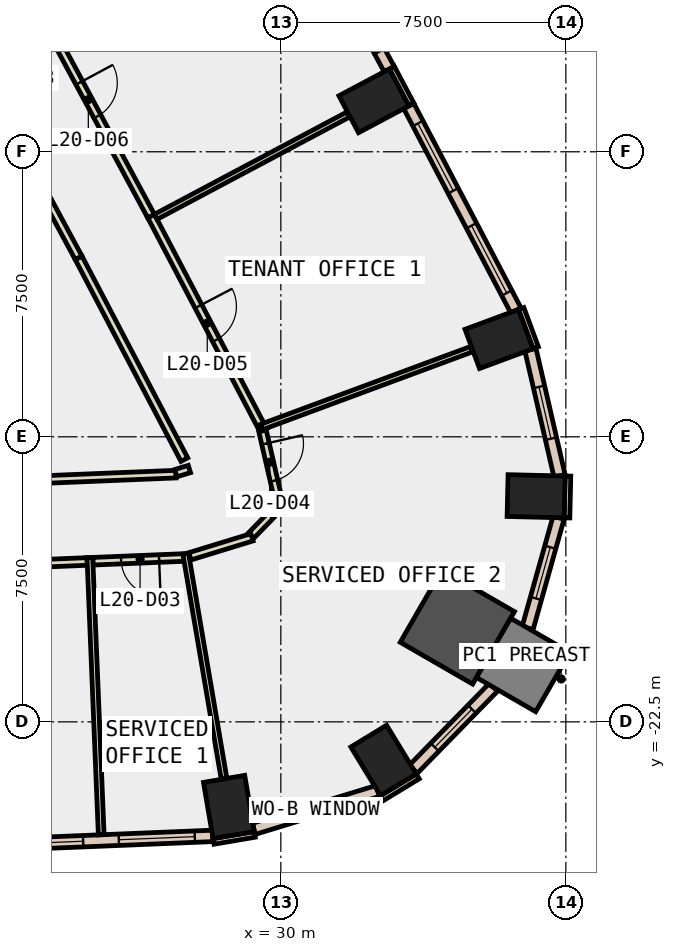
"""IFC4 building model, lengths in metres.
Left out: names, types, materials, properties, quantities, classifications, styles, units other than length and angle.
Written with IfcOpenShell. Run it as: python <this file> out.ifc"""

import sys

from ifc_helpers import new_model, si_unit, direction, frame, frame_2d, origin, origin_2d, place, context, subcontext, project, spatial, rectangle, extrude, element, fill, save


model = new_model("IFC4")
c1 = context("Model", 3, precision=1e-05, world=origin(), true_north=direction((0.0, 1.0)))
c2 = subcontext(c1, "Body", "Model", "MODEL_VIEW")
j1 = project(units=[si_unit("LENGTHUNIT", "METRE"), si_unit("PLANEANGLEUNIT", "RADIAN")], contexts=[c1])
p1 = place(None, origin())
s1 = spatial("IfcSite", under=j1, at=p1, CompositionType="ELEMENT")
p2 = place(p1, origin())
s2 = spatial("IfcBuilding", under=s1, at=p2, CompositionType="ELEMENT")
p3 = place(p2, frame((0.0, 0.0, 95.0)))
s3 = spatial("IfcBuildingStorey", under=s2, at=p3, CompositionType="ELEMENT", Elevation=95.0)
for number, where, z_axis, x_axis in (
    (1, (28.633, -24.74, -0.4), (0.0, 0.0, 1.0), (0.986, 0.168, 0.0)),
    (2, (32.703, -23.516, -0.4), (0.0, 0.0, 1.0), (0.854, 0.52, 0.0)),
):
    element("IfcColumn", number, at=place(p3, frame(where, z_axis=z_axis, x_axis=x_axis)), inside=s3, PredefinedType="COLUMN", context=c2, shape_type="SweptSolid", body=[
        extrude(rectangle(XDim=1.1, YDim=1.5, at=origin_2d()), origin(), (0.0, 0.0, 1.0), 4.2),
    ])
p4 = place(p3, frame((34.645, -20.003, -0.4), z_axis=(0.0, 0.0, 1.0), x_axis=(-0.866025403784, 0.5, 0.0)))
e3 = element("IfcColumn", 3, at=p4, inside=s3, PredefinedType="COLUMN", context=c2, shape_type="SweptSolid", body=[
    extrude(rectangle(XDim=2.2, YDim=2.2, at=origin_2d()), origin(), (0.0, 0.0, 1.0), 4.2),
])
for number, where, z_axis, x_axis in (
    (4, (36.717, -16.564, -0.4), (0.0, 0.0, 1.0), (0.023, 1.0, 0.0)),
    (5, (35.741, -12.427, -0.4), (0.0, 0.0, 1.0), (-0.347, 0.938, 0.0)),
    (6, (32.449, -6.16, -0.4), (0.0, 0.0, 1.0), (-0.469, 0.883, 0.0)),
):
    element("IfcColumn", number, at=place(p3, frame(where, z_axis=z_axis, x_axis=x_axis)), inside=s3, PredefinedType="COLUMN", context=c2, shape_type="SweptSolid", body=[
        extrude(rectangle(XDim=1.1, YDim=1.5, at=origin_2d()), origin(), (0.0, 0.0, 1.0), 4.2),
    ])
p5 = place(p3, frame((36.377, -21.003, -0.4), z_axis=(0.0, 0.0, 1.0), x_axis=(-0.866025403784, 0.5, 0.0)))
e7 = element("IfcColumn", 7, at=p5, inside=s3, PredefinedType="COLUMN", context=c2, shape_type="SweptSolid", body=[
    extrude(rectangle(XDim=1.8, YDim=1.8, at=origin_2d()), origin(), (0.0, 0.0, 1.0), 4.2),
])
p6 = place(p3, frame((36.706, -12.656, 0.0), z_axis=(0.0, 0.0, 1.0), x_axis=(-0.347205967468, 0.937788897436, 0.0)))
e8 = element("IfcWall", 8, at=p6, inside=s3, PredefinedType="STANDARD", context=c2, shape_type="SweptSolid", body=[
    extrude(rectangle(XDim=1.1, YDim=0.15, at=frame_2d((0.55, 0.0))), origin(), (0.0, 0.0, 1.0), 3.8),
])
p7 = place(p3, frame((33.436, -6.259, 0.0), z_axis=(0.0, 0.0, 1.0), x_axis=(-0.469366248657, 0.883003581319, 0.0)))
e9 = element("IfcWall", 9, at=p7, inside=s3, PredefinedType="STANDARD", context=c2, shape_type="SweptSolid", body=[
    extrude(rectangle(XDim=1.1, YDim=0.15, at=frame_2d((0.55, 0.0))), origin(), (0.0, 0.0, 1.0), 3.8),
])
p8 = place(p3, frame((28.229, -25.646, 0.0), z_axis=(0.0, 0.0, 1.0), x_axis=(0.985763338892, 0.168138751323, 0.0)))
e10 = element("IfcWall", 10, at=p8, inside=s3, PredefinedType="STANDARD", context=c2, shape_type="SweptSolid", body=[
    extrude(rectangle(XDim=1.101, YDim=0.15, at=frame_2d((0.55, 0.0))), origin(), (0.0, 0.0, 1.0), 3.8),
])
for number, where, z_axis, x_axis in (
    (11, (32.662, -24.507, 0.0), (0.0, 0.0, 1.0), (0.854, 0.52, 0.0)),
    (12, (37.529, -17.133, 0.0), (0.0, 0.0, 1.0), (0.024, 1.0, 0.0)),
):
    element("IfcWall", number, at=place(p3, frame(where, z_axis=z_axis, x_axis=x_axis)), inside=s3, PredefinedType="STANDARD", context=c2, shape_type="SweptSolid", body=[
        extrude(rectangle(XDim=1.1, YDim=0.15, at=frame_2d((0.55, 0.0))), origin(), (0.0, 0.0, 1.0), 3.8),
    ])
p9 = place(p3, frame((22.332, -25.742, 0.0), z_axis=(0.0, 0.0, 1.0), x_axis=(0.999159360905, 0.040994774244, 0.0)))
e13 = element("IfcWall", 13, at=p9, inside=s3, PredefinedType="STANDARD", context=c2, shape_type="SweptSolid", body=[
    extrude(rectangle(XDim=5.878, YDim=0.3, at=frame_2d((2.939, 0.0))), origin(), (0.0, 0.0, 1.0), 3.8),
])
p10 = place(p9, frame((0.469, 0.0, 0.9)))
e14 = element("IfcOpeningElement", 14, at=p10, cuts=e13, PredefinedType="OPENING", context=c2, shape_type="SweptSolid", body=[
    extrude(rectangle(XDim=2.0, YDim=2.6, at=frame_2d((1.0, 1.3))), frame((0.0, 0.16, 0.0), z_axis=(0.0, -1.0, 0.0), x_axis=(1.0, 0.0, 0.0)), (0.0, 0.0, 1.0), 0.32),
])
p11 = place(p9, frame((3.408, 0.0, 0.9)))
e15 = element("IfcOpeningElement", 15, at=p11, cuts=e13, PredefinedType="OPENING", context=c2, shape_type="SweptSolid", body=[
    extrude(rectangle(XDim=2.0, YDim=2.6, at=frame_2d((1.0, 1.3))), frame((0.0, 0.16, 0.0), z_axis=(0.0, -1.0, 0.0), x_axis=(1.0, 0.0, 0.0)), (0.0, 0.0, 1.0), 0.32),
])
p12 = place(p3, frame((29.288, -25.316, 0.0), z_axis=(0.0, 0.0, 1.0), x_axis=(0.956317661006, 0.292329490895, 0.0)))
e16 = element("IfcWall", 16, at=p12, inside=s3, PredefinedType="STANDARD", context=c2, shape_type="SweptSolid", body=[
    extrude(rectangle(XDim=3.41, YDim=0.3, at=frame_2d((1.705, 0.0))), origin(), (0.0, 0.0, 1.0), 3.8),
])
p13 = place(p12, frame((1.005, 0.0, 0.9)))
e17 = element("IfcOpeningElement", 17, at=p13, cuts=e16, PredefinedType="OPENING", context=c2, shape_type="SweptSolid", body=[
    extrude(rectangle(XDim=1.4, YDim=2.6, at=frame_2d((0.7, 1.3))), frame((0.0, 0.16, 0.0), z_axis=(0.0, -1.0, 0.0), x_axis=(1.0, 0.0, 0.0)), (0.0, 0.0, 1.0), 0.32),
])
p14 = place(p3, frame((33.486, -23.747, 0.0), z_axis=(0.0, 0.0, 1.0), x_axis=(0.698928244773, 0.715191798512, 0.0)))
e18 = element("IfcWall", 18, at=p14, inside=s3, PredefinedType="STANDARD", context=c2, shape_type="SweptSolid", body=[
    extrude(rectangle(XDim=3.017, YDim=0.3, at=frame_2d((1.509, 0.0))), origin(), (0.0, 0.0, 1.0), 3.8),
])
p15 = place(p14, frame((0.809, 0.0, 0.9)))
e19 = element("IfcOpeningElement", 19, at=p15, cuts=e18, PredefinedType="OPENING", context=c2, shape_type="SweptSolid", body=[
    extrude(rectangle(XDim=1.4, YDim=2.6, at=frame_2d((0.7, 1.3))), frame((0.0, 0.16, 0.0), z_axis=(0.0, -1.0, 0.0), x_axis=(1.0, 0.0, 0.0)), (0.0, 0.0, 1.0), 0.32),
])
p16 = place(p3, frame((36.494, -20.032, 0.0), z_axis=(0.0, 0.0, 1.0), x_axis=(0.270176120308, 0.962810918102, 0.0)))
e20 = element("IfcWall", 20, at=p16, inside=s3, PredefinedType="STANDARD", context=c2, shape_type="SweptSolid", body=[
    extrude(rectangle(XDim=3.017, YDim=0.3, at=frame_2d((1.509, 0.0))), origin(), (0.0, 0.0, 1.0), 3.8),
])
p17 = place(p16, frame((0.809, 0.0, 0.9)))
e21 = element("IfcOpeningElement", 21, at=p17, cuts=e20, PredefinedType="OPENING", context=c2, shape_type="SweptSolid", body=[
    extrude(rectangle(XDim=1.4, YDim=2.6, at=frame_2d((0.7, 1.3))), frame((0.0, 0.16, 0.0), z_axis=(0.0, -1.0, 0.0), x_axis=(1.0, 0.0, 0.0)), (0.0, 0.0, 1.0), 0.32),
])
p18 = place(p3, frame((37.335, -16.029, 0.0), z_axis=(0.0, 0.0, 1.0), x_axis=(-0.224859506699, 0.974391195695, 0.0)))
e22 = element("IfcWall", 22, at=p18, inside=s3, PredefinedType="STANDARD", context=c2, shape_type="SweptSolid", body=[
    extrude(rectangle(XDim=3.41, YDim=0.3, at=frame_2d((1.705, 0.0))), origin(), (0.0, 0.0, 1.0), 3.8),
])
p19 = place(p18, frame((1.005, 0.0, 0.9)))
e23 = element("IfcOpeningElement", 23, at=p19, cuts=e22, PredefinedType="OPENING", context=c2, shape_type="SweptSolid", body=[
    extrude(rectangle(XDim=1.4, YDim=2.6, at=frame_2d((0.7, 1.3))), frame((0.0, 0.16, 0.0), z_axis=(0.0, -1.0, 0.0), x_axis=(1.0, 0.0, 0.0)), (0.0, 0.0, 1.0), 0.32),
])
p20 = place(p3, frame((36.186, -11.676, 0.0), z_axis=(0.0, 0.0, 1.0), x_axis=(-0.464187178015, 0.885737130173, 0.0)))
e24 = element("IfcWall", 24, at=p20, inside=s3, PredefinedType="STANDARD", context=c2, shape_type="SweptSolid", body=[
    extrude(rectangle(XDim=6.075, YDim=0.3, at=frame_2d((3.038, 0.0))), origin(), (0.0, 0.0, 1.0), 3.8),
])
p21 = place(p20, frame((0.519, 0.0, 0.9)))
e25 = element("IfcOpeningElement", 25, at=p21, cuts=e24, PredefinedType="OPENING", context=c2, shape_type="SweptSolid", body=[
    extrude(rectangle(XDim=2.0, YDim=2.6, at=frame_2d((1.0, 1.3))), frame((0.0, 0.16, 0.0), z_axis=(0.0, -1.0, 0.0), x_axis=(1.0, 0.0, 0.0)), (0.0, 0.0, 1.0), 0.32),
])
p22 = place(p20, frame((3.556, 0.0, 0.9)))
e26 = element("IfcOpeningElement", 26, at=p22, cuts=e24, PredefinedType="OPENING", context=c2, shape_type="SweptSolid", body=[
    extrude(rectangle(XDim=2.0, YDim=2.6, at=frame_2d((1.0, 1.3))), frame((0.0, 0.16, 0.0), z_axis=(0.0, -1.0, 0.0), x_axis=(1.0, 0.0, 0.0)), (0.0, 0.0, 1.0), 0.32),
])
p23 = place(p3, frame((32.851, -5.325, 0.0), z_axis=(0.0, 0.0, 1.0), x_axis=(-0.474369552216, 0.880325807829, 0.0)))
e27 = element("IfcWall", 27, at=p23, inside=s3, PredefinedType="STANDARD", context=c2, shape_type="SweptSolid", body=[
    extrude(rectangle(XDim=6.099, YDim=0.3, at=frame_2d((3.049, 0.0))), origin(), (0.0, 0.0, 1.0), 3.8),
])
p24 = place(p23, frame((0.525, 0.0, 0.9)))
e28 = element("IfcOpeningElement", 28, at=p24, cuts=e27, PredefinedType="OPENING", context=c2, shape_type="SweptSolid", body=[
    extrude(rectangle(XDim=2.0, YDim=2.6, at=frame_2d((1.0, 1.3))), frame((0.0, 0.16, 0.0), z_axis=(0.0, -1.0, 0.0), x_axis=(1.0, 0.0, 0.0)), (0.0, 0.0, 1.0), 0.32),
])
p25 = place(p23, frame((3.574, 0.0, 0.9)))
e29 = element("IfcOpeningElement", 29, at=p25, cuts=e27, PredefinedType="OPENING", context=c2, shape_type="SweptSolid", body=[
    extrude(rectangle(XDim=2.0, YDim=2.6, at=frame_2d((1.0, 1.3))), frame((0.0, 0.16, 0.0), z_axis=(0.0, -1.0, 0.0), x_axis=(1.0, 0.0, 0.0)), (0.0, 0.0, 1.0), 0.32),
])
p26 = place(p3, frame((21.446, -16.22, 0.0), z_axis=(0.0, 0.0, 1.0), x_axis=(0.999157128819, 0.041049140426, 0.0)))
e30 = element("IfcWall", 30, at=p26, inside=s3, PredefinedType="PARTITIONING", context=c2, shape_type="SweptSolid", body=[
    extrude(rectangle(XDim=5.799, YDim=0.2, at=frame_2d((2.899, 0.0))), origin(), (0.0, 0.0, 1.0), 3.8),
])
p27 = place(p3, frame((27.235, -15.957, 0.0), z_axis=(0.0, 0.0, 1.0), x_axis=(0.956017741345, 0.293308844453, 0.0)))
e31 = element("IfcWall", 31, at=p27, inside=s3, PredefinedType="PARTITIONING", context=c2, shape_type="SweptSolid", body=[
    extrude(rectangle(XDim=0.375, YDim=0.2, at=frame_2d((0.188, 0.0))), origin(), (0.0, 0.0, 1.0), 3.8),
])
p28 = place(p3, frame((27.461, -15.6, 0.0), z_axis=(0.0, 0.0, 1.0), x_axis=(-0.464203280494, 0.885728691179, 0.0)))
e32 = element("IfcWall", 32, at=p28, inside=s3, PredefinedType="PARTITIONING", context=c2, shape_type="SweptSolid", body=[
    extrude(rectangle(XDim=5.995, YDim=0.2, at=frame_2d((2.998, 0.0))), origin(), (0.0, 0.0, 1.0), 3.8),
])
p29 = place(p3, frame((24.678, -10.29, 0.0), z_axis=(0.0, 0.0, 1.0), x_axis=(-0.474391588657, 0.880313932987, 0.0)))
e33 = element("IfcWall", 33, at=p29, inside=s3, PredefinedType="PARTITIONING", context=c2, shape_type="SweptSolid", body=[
    extrude(rectangle(XDim=7.085, YDim=0.2, at=frame_2d((3.542, 0.0))), origin(), (0.0, 0.0, 1.0), 3.8),
])
p30 = place(p29, frame((2.642, 0.0, 0.0)))
e34 = element("IfcOpeningElement", 34, at=p30, cuts=e33, PredefinedType="OPENING", context=c2, shape_type="SweptSolid", body=[
    extrude(rectangle(XDim=1.8, YDim=2.1, at=frame_2d((0.9, 1.05))), frame((0.0, 0.11, 0.0), z_axis=(0.0, -1.0, 0.0), x_axis=(1.0, 0.0, 0.0)), (0.0, 0.0, 1.0), 0.22),
])
p31 = place(p3, frame((24.904, -18.28, 0.0), z_axis=(0.0, 0.0, 1.0), x_axis=(-0.999156550882, -0.041063205305, 0.0)))
e35 = element("IfcWall", 35, at=p31, inside=s3, PredefinedType="PARTITIONING", context=c2, shape_type="SweptSolid", body=[
    extrude(rectangle(XDim=3.383, YDim=0.2, at=frame_2d((1.691, 0.0))), origin(), (0.0, 0.0, 1.0), 3.8),
])
p32 = place(p3, frame((27.538, -18.172, 0.0), z_axis=(0.0, 0.0, 1.0), x_axis=(-0.999161261417, -0.040948427126, 0.0)))
e36 = element("IfcWall", 36, at=p32, inside=s3, PredefinedType="PARTITIONING", context=c2, shape_type="SweptSolid", body=[
    extrude(rectangle(XDim=2.486, YDim=0.2, at=frame_2d((1.243, 0.0))), origin(), (0.0, 0.0, 1.0), 3.8),
])
p33 = place(p32, frame((0.743, 0.0, 0.0)))
e37 = element("IfcOpeningElement", 37, at=p33, cuts=e36, PredefinedType="OPENING", context=c2, shape_type="SweptSolid", body=[
    extrude(rectangle(XDim=1.0, YDim=2.1, at=frame_2d((0.5, 1.05))), frame((0.0, 0.11, 0.0), z_axis=(0.0, -1.0, 0.0), x_axis=(1.0, 0.0, 0.0)), (0.0, 0.0, 1.0), 0.22),
])
p34 = place(p3, frame((29.517, -14.838, 0.0), z_axis=(0.0, 0.0, 1.0), x_axis=(0.224316169854, -0.974516421587, 0.0)))
e38 = element("IfcWall", 38, at=p34, inside=s3, PredefinedType="PARTITIONING", context=c2, shape_type="SweptSolid", body=[
    extrude(rectangle(XDim=1.707, YDim=0.2, at=frame_2d((0.853, 0.0))), origin(), (0.0, 0.0, 1.0), 3.8),
])
p35 = place(p34, frame((0.353, 0.0, 0.0)))
e39 = element("IfcOpeningElement", 39, at=p35, cuts=e38, PredefinedType="OPENING", context=c2, shape_type="SweptSolid", body=[
    extrude(rectangle(XDim=1.0, YDim=2.1, at=frame_2d((0.5, 1.05))), frame((0.0, 0.11, 0.0), z_axis=(0.0, -1.0, 0.0), x_axis=(1.0, 0.0, 0.0)), (0.0, 0.0, 1.0), 0.22),
])
p36 = place(p3, frame((29.851, -16.5, 0.0), z_axis=(0.0, 0.0, 1.0), x_axis=(-0.269792639482, -0.962918444979, 0.0)))
e40 = element("IfcWall", 40, at=p36, inside=s3, PredefinedType="PARTITIONING", context=c2, shape_type="SweptSolid", body=[
    extrude(rectangle(XDim=0.557, YDim=0.2, at=frame_2d((0.278, 0.0))), origin(), (0.0, 0.0, 1.0), 3.8),
])
p37 = place(p3, frame((29.743, -17.061, 0.0), z_axis=(0.0, 0.0, 1.0), x_axis=(-0.698331924638, -0.715774072617, 0.0)))
e41 = element("IfcWall", 41, at=p37, inside=s3, PredefinedType="PARTITIONING", context=c2, shape_type="SweptSolid", body=[
    extrude(rectangle(XDim=0.756, YDim=0.2, at=frame_2d((0.378, 0.0))), origin(), (0.0, 0.0, 1.0), 3.8),
])
p38 = place(p3, frame((29.24, -17.644, 0.0), z_axis=(0.0, 0.0, 1.0), x_axis=(-0.956137025409, -0.292919764852, 0.0)))
e42 = element("IfcWall", 42, at=p38, inside=s3, PredefinedType="PARTITIONING", context=c2, shape_type="SweptSolid", body=[
    extrude(rectangle(XDim=1.707, YDim=0.2, at=frame_2d((0.854, 0.0))), origin(), (0.0, 0.0, 1.0), 3.8),
])
p39 = place(p3, frame((26.586, -9.191, 0.0), z_axis=(0.0, 0.0, 1.0), x_axis=(0.46422194761, -0.885718907643, 0.0)))
e43 = element("IfcWall", 43, at=p39, inside=s3, PredefinedType="PARTITIONING", context=c2, shape_type="SweptSolid", body=[
    extrude(rectangle(XDim=6.366, YDim=0.2, at=frame_2d((3.183, 0.0))), origin(), (0.0, 0.0, 1.0), 3.8),
])
p40 = place(p39, frame((2.683, 0.0, 0.0)))
e44 = element("IfcOpeningElement", 44, at=p40, cuts=e43, PredefinedType="OPENING", context=c2, shape_type="SweptSolid", body=[
    extrude(rectangle(XDim=1.0, YDim=2.1, at=frame_2d((0.5, 1.05))), frame((0.0, 0.11, 0.0), z_axis=(0.0, -1.0, 0.0), x_axis=(1.0, 0.0, 0.0)), (0.0, 0.0, 1.0), 0.22),
])
p41 = place(p3, frame((23.212, -2.932, 0.0), z_axis=(0.0, 0.0, 1.0), x_axis=(0.474404892994, -0.880306763295, 0.0)))
e45 = element("IfcWall", 45, at=p41, inside=s3, PredefinedType="PARTITIONING", context=c2, shape_type="SweptSolid", body=[
    extrude(rectangle(XDim=7.11, YDim=0.2, at=frame_2d((3.555, 0.0))), origin(), (0.0, 0.0, 1.0), 3.8),
])
p42 = place(p41, frame((3.13, 0.0, 0.0)))
e46 = element("IfcOpeningElement", 46, at=p42, cuts=e45, PredefinedType="OPENING", context=c2, shape_type="SweptSolid", body=[
    extrude(rectangle(XDim=1.0, YDim=2.1, at=frame_2d((0.5, 1.05))), frame((0.0, 0.11, 0.0), z_axis=(0.0, -1.0, 0.0), x_axis=(1.0, 0.0, 0.0)), (0.0, 0.0, 1.0), 0.22),
])
p43 = place(p3, frame((24.975, -18.177, 0.0), z_axis=(0.0, 0.0, 1.0), x_axis=(0.040934999913, -0.999161811611, 0.0)))
e47 = element("IfcWall", 47, at=p43, inside=s3, PredefinedType="PARTITIONING", context=c2, shape_type="SweptSolid", body=[
    extrude(rectangle(XDim=7.3, YDim=0.15, at=frame_2d((3.65, 0.0))), origin(), (0.0, 0.0, 1.0), 3.8),
])
p44 = place(p3, frame((27.496, -18.074, 0.0), z_axis=(0.0, 0.0, 1.0), x_axis=(0.168025125373, -0.985782712997, 0.0)))
e48 = element("IfcWall", 48, at=p44, inside=s3, PredefinedType="PARTITIONING", context=c2, shape_type="SweptSolid", body=[
    extrude(rectangle(XDim=5.992, YDim=0.15, at=frame_2d((2.996, 0.0))), origin(), (0.0, 0.0, 1.0), 3.8),
])
p45 = place(p3, frame((29.494, -14.741, 0.0), z_axis=(0.0, 0.0, 1.0), x_axis=(0.937719767819, 0.347392626636, 0.0)))
e49 = element("IfcWall", 49, at=p45, inside=s3, PredefinedType="PARTITIONING", context=c2, shape_type="SweptSolid", body=[
    extrude(rectangle(XDim=5.892, YDim=0.15, at=frame_2d((2.946, 0.0))), origin(), (0.0, 0.0, 1.0), 3.8),
])
p46 = place(p3, frame((26.709, -9.211, 0.0), z_axis=(0.0, 0.0, 1.0), x_axis=(0.883057238515, 0.46926529118, 0.0)))
e50 = element("IfcWall", 50, at=p46, inside=s3, PredefinedType="PARTITIONING", context=c2, shape_type="SweptSolid", body=[
    extrude(rectangle(XDim=5.73, YDim=0.15, at=frame_2d((2.865, 0.0))), origin(), (0.0, 0.0, 1.0), 3.8),
])
p47 = place(p10, origin())
e51 = element("IfcWindow", 51, at=p47, inside=s3, PartitioningType="SINGLE_PANEL", PredefinedType="WINDOW", context=c2, shape_type="SweptSolid", body=[
    extrude(rectangle(XDim=2.0, YDim=2.6, at=frame_2d((1.0, 1.3))), frame((0.0, 0.03, 0.0), z_axis=(0.0, -1.0, 0.0), x_axis=(1.0, 0.0, 0.0)), (0.0, 0.0, 1.0), 0.06),
])
fill(e14, e51)
p48 = place(p11, origin())
e52 = element("IfcWindow", 52, at=p48, inside=s3, PartitioningType="SINGLE_PANEL", PredefinedType="WINDOW", context=c2, shape_type="SweptSolid", body=[
    extrude(rectangle(XDim=2.0, YDim=2.6, at=frame_2d((1.0, 1.3))), frame((0.0, 0.03, 0.0), z_axis=(0.0, -1.0, 0.0), x_axis=(1.0, 0.0, 0.0)), (0.0, 0.0, 1.0), 0.06),
])
fill(e15, e52)
p49 = place(p13, origin())
e53 = element("IfcWindow", 53, at=p49, inside=s3, PartitioningType="SINGLE_PANEL", PredefinedType="WINDOW", context=c2, shape_type="SweptSolid", body=[
    extrude(rectangle(XDim=1.4, YDim=2.6, at=frame_2d((0.7, 1.3))), frame((0.0, 0.03, 0.0), z_axis=(0.0, -1.0, 0.0), x_axis=(1.0, 0.0, 0.0)), (0.0, 0.0, 1.0), 0.06),
])
fill(e17, e53)
p50 = place(p15, origin())
e54 = element("IfcWindow", 54, at=p50, inside=s3, PartitioningType="SINGLE_PANEL", PredefinedType="WINDOW", context=c2, shape_type="SweptSolid", body=[
    extrude(rectangle(XDim=1.4, YDim=2.6, at=frame_2d((0.7, 1.3))), frame((0.0, 0.03, 0.0), z_axis=(0.0, -1.0, 0.0), x_axis=(1.0, 0.0, 0.0)), (0.0, 0.0, 1.0), 0.06),
])
fill(e19, e54)
p51 = place(p17, origin())
e55 = element("IfcWindow", 55, at=p51, inside=s3, PartitioningType="SINGLE_PANEL", PredefinedType="WINDOW", context=c2, shape_type="SweptSolid", body=[
    extrude(rectangle(XDim=1.4, YDim=2.6, at=frame_2d((0.7, 1.3))), frame((0.0, 0.03, 0.0), z_axis=(0.0, -1.0, 0.0), x_axis=(1.0, 0.0, 0.0)), (0.0, 0.0, 1.0), 0.06),
])
fill(e21, e55)
p52 = place(p19, origin())
e56 = element("IfcWindow", 56, at=p52, inside=s3, PartitioningType="SINGLE_PANEL", PredefinedType="WINDOW", context=c2, shape_type="SweptSolid", body=[
    extrude(rectangle(XDim=1.4, YDim=2.6, at=frame_2d((0.7, 1.3))), frame((0.0, 0.03, 0.0), z_axis=(0.0, -1.0, 0.0), x_axis=(1.0, 0.0, 0.0)), (0.0, 0.0, 1.0), 0.06),
])
fill(e23, e56)
p53 = place(p21, origin())
e57 = element("IfcWindow", 57, at=p53, inside=s3, PartitioningType="SINGLE_PANEL", PredefinedType="WINDOW", context=c2, shape_type="SweptSolid", body=[
    extrude(rectangle(XDim=2.0, YDim=2.6, at=frame_2d((1.0, 1.3))), frame((0.0, 0.03, 0.0), z_axis=(0.0, -1.0, 0.0), x_axis=(1.0, 0.0, 0.0)), (0.0, 0.0, 1.0), 0.06),
])
fill(e25, e57)
p54 = place(p22, origin())
e58 = element("IfcWindow", 58, at=p54, inside=s3, PartitioningType="SINGLE_PANEL", PredefinedType="WINDOW", context=c2, shape_type="SweptSolid", body=[
    extrude(rectangle(XDim=2.0, YDim=2.6, at=frame_2d((1.0, 1.3))), frame((0.0, 0.03, 0.0), z_axis=(0.0, -1.0, 0.0), x_axis=(1.0, 0.0, 0.0)), (0.0, 0.0, 1.0), 0.06),
])
fill(e26, e58)
p55 = place(p33, origin())
e59 = element("IfcDoor", 59, at=p55, inside=s3, OperationType="SINGLE_SWING_LEFT", PredefinedType="DOOR", context=c2, shape_type="SweptSolid", body=[
    extrude(rectangle(XDim=1.0, YDim=2.1, at=frame_2d((0.5, 1.05))), frame((0.0, 0.025, 0.0), z_axis=(0.0, -1.0, 0.0), x_axis=(1.0, 0.0, 0.0)), (0.0, 0.0, 1.0), 0.05),
])
fill(e37, e59)
p56 = place(p35, origin())
e60 = element("IfcDoor", 60, at=p56, inside=s3, OperationType="SINGLE_SWING_RIGHT", PredefinedType="DOOR", context=c2, shape_type="SweptSolid", body=[
    extrude(rectangle(XDim=1.0, YDim=2.1, at=frame_2d((0.5, 1.05))), frame((0.0, 0.025, 0.0), z_axis=(0.0, -1.0, 0.0), x_axis=(1.0, 0.0, 0.0)), (0.0, 0.0, 1.0), 0.05),
])
fill(e39, e60)
p57 = place(p40, origin())
e61 = element("IfcDoor", 61, at=p57, inside=s3, OperationType="SINGLE_SWING_LEFT", PredefinedType="DOOR", context=c2, shape_type="SweptSolid", body=[
    extrude(rectangle(XDim=1.0, YDim=2.1, at=frame_2d((0.5, 1.05))), frame((0.0, 0.025, 0.0), z_axis=(0.0, -1.0, 0.0), x_axis=(1.0, 0.0, 0.0)), (0.0, 0.0, 1.0), 0.05),
])
fill(e44, e61)
p58 = place(p42, origin())
e62 = element("IfcDoor", 62, at=p58, inside=s3, OperationType="SINGLE_SWING_LEFT", PredefinedType="DOOR", context=c2, shape_type="SweptSolid", body=[
    extrude(rectangle(XDim=1.0, YDim=2.1, at=frame_2d((0.5, 1.05))), frame((0.0, 0.025, 0.0), z_axis=(0.0, -1.0, 0.0), x_axis=(1.0, 0.0, 0.0)), (0.0, 0.0, 1.0), 0.05),
])
fill(e46, e62)
save(model, sys.argv[1])
